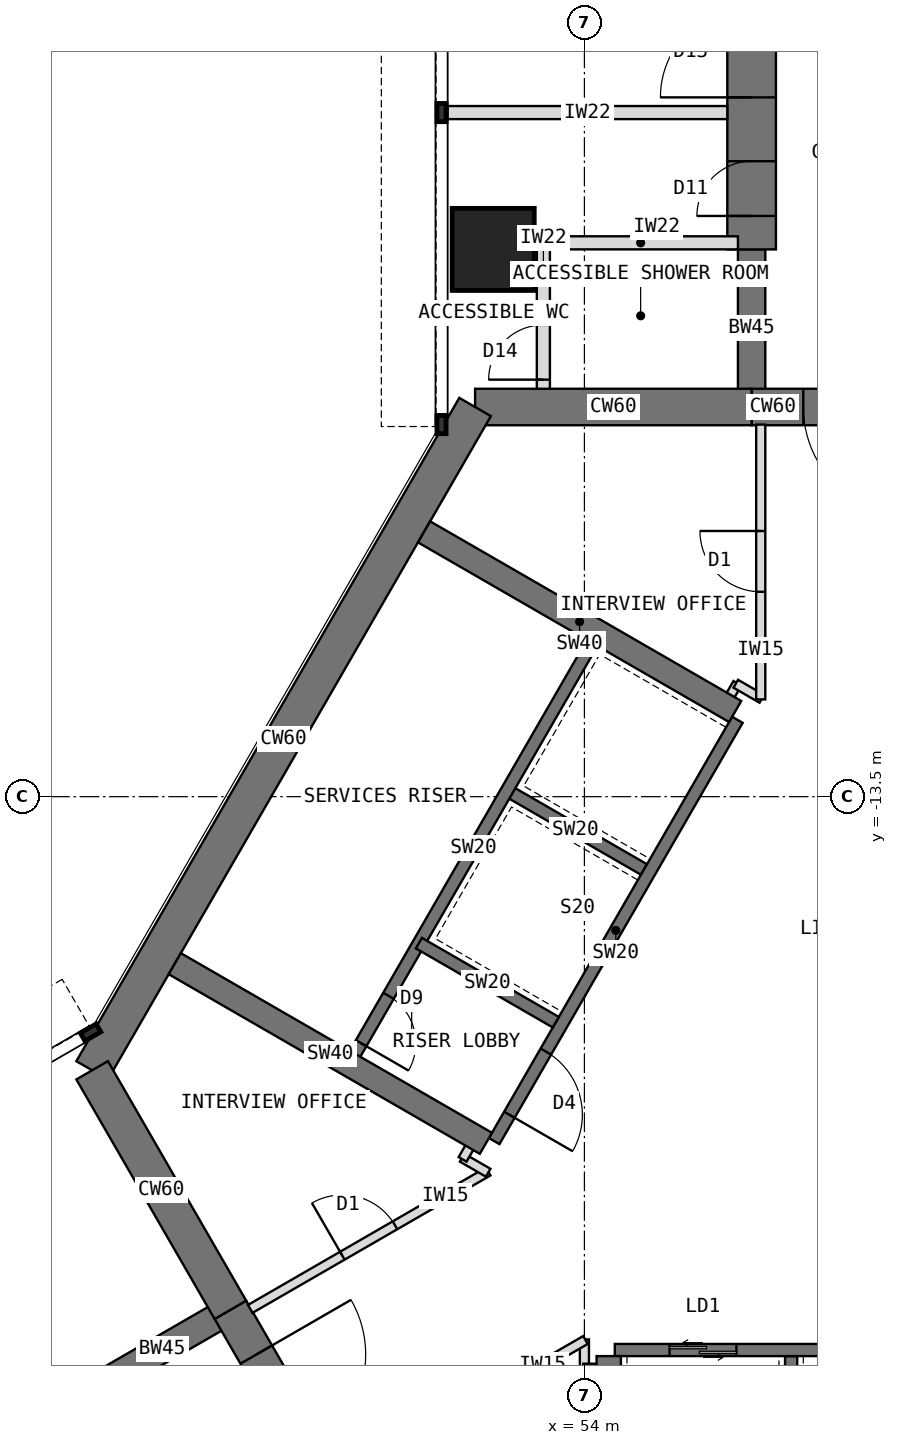
"""IFC4 building model, lengths in metres.
Left out: names, types, materials, properties, quantities, classifications, styles, units other than length and angle.
Written with IfcOpenShell. Run it as: python <this file> out.ifc"""

import sys

from ifc_helpers import new_model, si_unit, direction, frame, frame_2d, origin, origin_2d, place, context, subcontext, project, spatial, rectangle, extrude, element, fill, save


model = new_model("IFC4")
c1 = context("Model", 3, precision=1e-05, world=origin(), true_north=direction((0.0, 1.0)))
c2 = subcontext(c1, "Body", "Model", "MODEL_VIEW")
j1 = project(units=[si_unit("LENGTHUNIT", "METRE"), si_unit("PLANEANGLEUNIT", "RADIAN")], contexts=[c1])
p1 = place(None, origin())
s1 = spatial("IfcSite", under=j1, at=p1, CompositionType="ELEMENT")
p2 = place(p1, origin())
s2 = spatial("IfcBuilding", under=s1, at=p2, CompositionType="ELEMENT")
p3 = place(p2, frame((0.0, 0.0, 101.5)))
s3 = spatial("IfcBuildingStorey", under=s2, at=p3, CompositionType="ELEMENT", Elevation=101.5)
p4 = place(p3, frame((60.25, -7.092, 0.0), z_axis=(0.0, 0.0, 1.0), x_axis=(-1.0, 0.0, 0.0)))
e1 = element("IfcWall", 1, at=p4, inside=s3, PredefinedType="SHEAR", context=c2, shape_type="SweptSolid", body=[
    extrude(rectangle(XDim=3.5, YDim=0.6, at=frame_2d((1.75, 0.0))), origin(), (0.0, 0.0, 1.0), 4.0),
])
p5 = place(p4, frame((0.85, 0.0, 0.0)))
e2 = element("IfcOpeningElement", 2, at=p5, cuts=e1, PredefinedType="OPENING", context=c2, shape_type="SweptSolid", body=[
    extrude(rectangle(XDim=1.8, YDim=2.1, at=frame_2d((0.9, 1.05))), frame((0.0, 0.31, 0.0), z_axis=(0.0, -1.0, 0.0), x_axis=(1.0, 0.0, 0.0)), (0.0, 0.0, 1.0), 0.62),
])
p6 = place(p3, frame((56.75, -7.092, 0.0), z_axis=(0.0, 0.0, 1.0), x_axis=(-1.0, 0.0, 0.0)))
e3 = element("IfcWall", 3, at=p6, inside=s3, PredefinedType="SHEAR", context=c2, shape_type="SweptSolid", body=[
    extrude(rectangle(XDim=4.548, YDim=0.6, at=frame_2d((2.274, 0.0))), origin(), (0.0, 0.0, 1.0), 4.0),
])
p7 = place(p3, frame((52.202, -7.092, 0.0), z_axis=(0.0, 0.0, 1.0), x_axis=(-0.500005998175, -0.866021940709, 0.0)))
e4 = element("IfcWall", 4, at=p7, inside=s3, PredefinedType="SHEAR", context=c2, shape_type="SweptSolid", body=[
    extrude(rectangle(XDim=12.596, YDim=0.6, at=frame_2d((6.298, 0.0))), origin(), (0.0, 0.0, 1.0), 4.0),
])
p8 = place(p3, frame((45.904, -18.0, 0.0), z_axis=(0.0, 0.0, 1.0), x_axis=(0.500024481964, -0.866011268655, 0.0)))
e5 = element("IfcWall", 5, at=p8, inside=s3, PredefinedType="SHEAR", context=c2, shape_type="SweptSolid", body=[
    extrude(rectangle(XDim=4.548, YDim=0.6, at=frame_2d((2.274, 0.0))), origin(), (0.0, 0.0, 1.0), 4.0),
])
p9 = place(p3, frame((48.178, -21.939, 0.0), z_axis=(0.0, 0.0, 1.0), x_axis=(0.500010275428, -0.866019471182, 0.0)))
e6 = element("IfcWall", 6, at=p9, inside=s3, PredefinedType="SHEAR", context=c2, shape_type="SweptSolid", body=[
    extrude(rectangle(XDim=3.5, YDim=0.6, at=frame_2d((1.75, 0.0))), origin(), (0.0, 0.0, 1.0), 4.0),
])
p10 = place(p9, frame((0.85, 0.0, 0.0)))
e7 = element("IfcOpeningElement", 7, at=p10, cuts=e6, PredefinedType="OPENING", context=c2, shape_type="SweptSolid", body=[
    extrude(rectangle(XDim=1.8, YDim=2.1, at=frame_2d((0.9, 1.05))), frame((0.0, 0.31, 0.0), z_axis=(0.0, -1.0, 0.0), x_axis=(1.0, 0.0, 0.0)), (0.0, 0.0, 1.0), 0.62),
])
p11 = place(p3, frame((56.75, -7.092, 0.0), z_axis=(0.0, 0.0, 1.0), x_axis=(0.0, 1.0, 0.0)))
e8 = element("IfcWall", 8, at=p11, inside=s3, PredefinedType="SHEAR", context=c2, shape_type="SweptSolid", body=[
    extrude(rectangle(XDim=2.592, YDim=0.45, at=frame_2d((1.296, 0.0))), origin(), (0.0, 0.0, 1.0), 4.0),
])
p12 = place(p3, frame((56.75, -4.5, 0.0), z_axis=(0.0, 0.0, 1.0), x_axis=(0.0, 1.0, 0.0)))
e9 = element("IfcWall", 9, at=p12, inside=s3, PredefinedType="SHEAR", context=c2, shape_type="SweptSolid", body=[
    extrude(rectangle(XDim=13.2, YDim=0.8, at=frame_2d((6.6, 0.0))), origin(), (0.0, 0.0, 1.0), 4.0),
])
p13 = place(p12, frame((0.55, 0.0, 0.0)))
e10 = element("IfcOpeningElement", 10, at=p13, cuts=e9, PredefinedType="OPENING", context=c2, shape_type="SweptSolid", body=[
    extrude(rectangle(XDim=0.9, YDim=2.1, at=frame_2d((0.45, 1.05))), frame((0.0, 0.41, 0.0), z_axis=(0.0, -1.0, 0.0), x_axis=(1.0, 0.0, 0.0)), (0.0, 0.0, 1.0), 0.82),
])
p14 = place(p12, frame((2.5, 0.0, 0.0)))
e11 = element("IfcOpeningElement", 11, at=p14, cuts=e9, PredefinedType="OPENING", context=c2, shape_type="SweptSolid", body=[
    extrude(rectangle(XDim=1.5, YDim=2.1, at=frame_2d((0.75, 1.05))), frame((0.0, 0.41, 0.0), z_axis=(0.0, -1.0, 0.0), x_axis=(1.0, 0.0, 0.0)), (0.0, 0.0, 1.0), 0.82),
])
p15 = place(p3, frame((48.178, -21.939, 0.0), z_axis=(0.0, 0.0, 1.0), x_axis=(-0.866072649678, -0.499918158782, 0.0)))
e12 = element("IfcWall", 12, at=p15, inside=s3, PredefinedType="SHEAR", context=c2, shape_type="SweptSolid", body=[
    extrude(rectangle(XDim=2.592, YDim=0.45, at=frame_2d((1.296, 0.0))), origin(), (0.0, 0.0, 1.0), 4.0),
])
p16 = place(p3, frame((52.5, -4.5, 0.0), z_axis=(0.0, 0.0, 1.0), x_axis=(1.0, 0.0, 0.0)))
e13 = element("IfcColumn", 13, at=p16, inside=s3, PredefinedType="COLUMN", context=c2, shape_type="SweptSolid", body=[
    extrude(rectangle(XDim=1.35, YDim=1.35, at=origin_2d()), origin(), (0.0, 0.0, 1.0), 4.0),
])
p17 = place(p3, frame((56.516, -12.236, 0.0), z_axis=(0.0, 0.0, 1.0), x_axis=(-0.49999894854, -0.866026010844, 0.0)))
e14 = element("IfcWall", 14, at=p17, inside=s3, PredefinedType="SHEAR", context=c2, shape_type="SweptSolid", body=[
    extrude(rectangle(XDim=8.0, YDim=0.2, at=frame_2d((4.0, 0.0))), origin(), (0.0, 0.0, 1.0), 4.0),
])
p18 = place(p17, frame((6.3, 0.0, 0.0)))
e15 = element("IfcOpeningElement", 15, at=p18, cuts=e14, PredefinedType="OPENING", context=c2, shape_type="SweptSolid", body=[
    extrude(rectangle(XDim=1.2, YDim=2.1, at=frame_2d((0.6, 1.05))), frame((0.0, 0.11, 0.0), z_axis=(0.0, -1.0, 0.0), x_axis=(1.0, 0.0, 0.0)), (0.0, 0.0, 1.0), 0.22),
])
for number, where, z_axis, x_axis in (
    (16, (54.98, -14.697, 0.0), (0.0, 0.0, 1.0), (-0.866, 0.5, 0.0)),
    (17, (53.53, -17.209, 0.0), (0.0, 0.0, 1.0), (-0.866, 0.5, 0.0)),
):
    element("IfcWall", number, at=place(p3, frame(where, z_axis=z_axis, x_axis=x_axis)), inside=s3, PredefinedType="SHEAR", context=c2, shape_type="SweptSolid", body=[
        extrude(rectangle(XDim=2.6, YDim=0.2, at=frame_2d((1.3, 0.0))), origin(), (0.0, 0.0, 1.0), 4.0),
    ])
p19 = place(p3, frame((54.178, -10.886, 0.0), z_axis=(0.0, 0.0, 1.0), x_axis=(-0.49999894854, -0.866026010844, 0.0)))
e18 = element("IfcWall", 18, at=p19, inside=s3, PredefinedType="SHEAR", context=c2, shape_type="SweptSolid", body=[
    extrude(rectangle(XDim=8.0, YDim=0.2, at=frame_2d((4.0, 0.0))), origin(), (0.0, 0.0, 1.0), 4.0),
])
p20 = place(p19, frame((6.8, 0.0, 0.0)))
e19 = element("IfcOpeningElement", 19, at=p20, cuts=e18, PredefinedType="OPENING", context=c2, shape_type="SweptSolid", body=[
    extrude(rectangle(XDim=0.9, YDim=2.1, at=frame_2d((0.45, 1.05))), frame((0.0, 0.11, 0.0), z_axis=(0.0, -1.0, 0.0), x_axis=(1.0, 0.0, 0.0)), (0.0, 0.0, 1.0), 0.22),
])
p21 = place(p3, frame((52.38, -19.201, 0.0), z_axis=(0.0, 0.0, 1.0), x_axis=(-0.866027317282, 0.49999668571, 0.0)))
e20 = element("IfcWall", 20, at=p21, inside=s3, PredefinedType="SHEAR", context=c2, shape_type="SweptSolid", body=[
    extrude(rectangle(XDim=5.908, YDim=0.4, at=frame_2d((2.954, 0.0))), origin(), (0.0, 0.0, 1.0), 4.0),
])
p22 = place(p3, frame((56.48, -12.099, 0.0), z_axis=(0.0, 0.0, 1.0), x_axis=(-0.866009424208, 0.500027676417, 0.0)))
e21 = element("IfcWall", 21, at=p22, inside=s3, PredefinedType="SHEAR", context=c2, shape_type="SweptSolid", body=[
    extrude(rectangle(XDim=5.908, YDim=0.4, at=frame_2d((2.954, 0.0))), origin(), (0.0, 0.0, 1.0), 4.0),
])
p23 = place(p3, frame((54.5, -22.6, 0.0), z_axis=(0.0, 0.0, 1.0), x_axis=(1.0, 0.0, 0.0)))
e22 = element("IfcWall", 22, at=p23, inside=s3, PredefinedType="SHEAR", context=c2, shape_type="SweptSolid", body=[
    extrude(rectangle(XDim=8.0, YDim=0.2, at=frame_2d((4.0, 0.0))), origin(), (0.0, 0.0, 1.0), 4.0),
])
p24 = place(p23, frame((6.3, 0.0, 0.0)))
e23 = element("IfcOpeningElement", 23, at=p24, cuts=e22, PredefinedType="OPENING", context=c2, shape_type="SweptSolid", body=[
    extrude(rectangle(XDim=1.2, YDim=2.1, at=frame_2d((0.6, 1.05))), frame((0.0, 0.11, 0.0), z_axis=(0.0, -1.0, 0.0), x_axis=(1.0, 0.0, 0.0)), (0.0, 0.0, 1.0), 0.22),
])
p25 = place(p23, frame((0.9, 0.0, 0.0)))
e24 = element("IfcOpeningElement", 24, at=p25, cuts=e22, PredefinedType="OPENING", context=c2, shape_type="SweptSolid", body=[
    extrude(rectangle(XDim=1.1, YDim=2.2, at=frame_2d((0.55, 1.1))), frame((0.0, 0.11, 0.0), z_axis=(0.0, -1.0, 0.0), x_axis=(1.0, 0.0, 0.0)), (0.0, 0.0, 1.0), 0.22),
])
p26 = place(p3, frame((57.4, -22.7, 0.0), z_axis=(0.0, 0.0, 1.0), x_axis=(0.0, -1.0, 0.0)))
e25 = element("IfcWall", 25, at=p26, inside=s3, PredefinedType="SHEAR", context=c2, shape_type="SweptSolid", body=[
    extrude(rectangle(XDim=2.6, YDim=0.2, at=frame_2d((1.3, 0.0))), origin(), (0.0, 0.0, 1.0), 4.0),
])
p27 = place(p3, frame((54.4, -22.7, 0.0), z_axis=(0.0, 0.0, 1.0), x_axis=(0.0, -1.0, 0.0)))
e26 = element("IfcWall", 26, at=p27, inside=s3, PredefinedType="SHEAR", context=c2, shape_type="SweptSolid", body=[
    extrude(rectangle(XDim=5.908, YDim=0.4, at=frame_2d((2.954, 0.0))), origin(), (0.0, 0.0, 1.0), 4.0),
])
p28 = place(p3, frame((56.35, -2.25, 0.0), z_axis=(0.0, 0.0, 1.0), x_axis=(-1.0, 0.0, 0.0)))
e27 = element("IfcWall", 27, at=p28, inside=s3, PredefinedType="PARTITIONING", context=c2, shape_type="SweptSolid", body=[
    extrude(rectangle(XDim=4.6, YDim=0.215, at=frame_2d((2.3, 0.0))), origin(), (0.0, 0.0, 1.0), 3.8),
])
p29 = place(p3, frame((53.325, -6.792, 0.0), z_axis=(0.0, 0.0, 1.0), x_axis=(0.0, 1.0, 0.0)))
e28 = element("IfcWall", 28, at=p29, inside=s3, PredefinedType="PARTITIONING", context=c2, shape_type="SweptSolid", body=[
    extrude(rectangle(XDim=2.4, YDim=0.215, at=frame_2d((1.2, 0.0))), origin(), (0.0, 0.0, 1.0), 3.8),
])
p30 = place(p29, frame((0.15, 0.0, 0.0)))
e29 = element("IfcOpeningElement", 29, at=p30, cuts=e28, PredefinedType="OPENING", context=c2, shape_type="SweptSolid", body=[
    extrude(rectangle(XDim=0.9, YDim=2.1, at=frame_2d((0.45, 1.05))), frame((0.0, 0.117, 0.0), z_axis=(0.0, -1.0, 0.0), x_axis=(1.0, 0.0, 0.0)), (0.0, 0.0, 1.0), 0.235),
])
p31 = place(p3, frame((56.525, -4.392, 0.0), z_axis=(0.0, 0.0, 1.0), x_axis=(-1.0, 0.0, 0.0)))
e30 = element("IfcWall", 30, at=p31, inside=s3, PredefinedType="PARTITIONING", context=c2, shape_type="SweptSolid", body=[
    extrude(rectangle(XDim=3.2, YDim=0.215, at=frame_2d((1.6, 0.0))), origin(), (0.0, 0.0, 1.0), 3.8),
])
p32 = place(p3, frame((54.0, -22.92, 0.0), z_axis=(0.0, 0.0, 1.0), x_axis=(0.0, 1.0, 0.0)))
e31 = element("IfcWall", 31, at=p32, inside=s3, PredefinedType="PARTITIONING", context=c2, shape_type="SweptSolid", body=[
    extrude(rectangle(XDim=0.494, YDim=0.15, at=frame_2d((0.247, 0.0))), origin(), (0.0, 0.0, 1.0), 3.8),
])
p33 = place(p3, frame((54.017, -22.436, 0.0), z_axis=(0.0, 0.0, 1.0), x_axis=(-0.86602002524, -0.500009315796, 0.0)))
e32 = element("IfcWall", 32, at=p33, inside=s3, PredefinedType="PARTITIONING", context=c2, shape_type="SweptSolid", body=[
    extrude(rectangle(XDim=4.519, YDim=0.15, at=frame_2d((2.259, 0.0))), origin(), (0.0, 0.0, 1.0), 3.8),
])
p34 = place(p33, frame((1.769, 0.0, 0.0)))
e33 = element("IfcOpeningElement", 33, at=p34, cuts=e32, PredefinedType="OPENING", context=c2, shape_type="SweptSolid", body=[
    extrude(rectangle(XDim=1.0, YDim=2.1, at=frame_2d((0.5, 1.05))), frame((0.0, 0.085, 0.0), z_axis=(0.0, -1.0, 0.0), x_axis=(1.0, 0.0, 0.0)), (0.0, 0.0, 1.0), 0.17),
])
p35 = place(p3, frame((48.504, -21.924, 0.0), z_axis=(0.0, 0.0, 1.0), x_axis=(0.866006515865, 0.500032713409, 0.0)))
e34 = element("IfcWall", 34, at=p35, inside=s3, PredefinedType="PARTITIONING", context=c2, shape_type="SweptSolid", body=[
    extrude(rectangle(XDim=4.518, YDim=0.15, at=frame_2d((2.259, 0.0))), origin(), (0.0, 0.0, 1.0), 3.8),
])
p36 = place(p35, frame((1.749, 0.0, 0.0)))
e35 = element("IfcOpeningElement", 35, at=p36, cuts=e34, PredefinedType="OPENING", context=c2, shape_type="SweptSolid", body=[
    extrude(rectangle(XDim=1.0, YDim=2.1, at=frame_2d((0.5, 1.05))), frame((0.0, 0.085, 0.0), z_axis=(0.0, -1.0, 0.0), x_axis=(1.0, 0.0, 0.0)), (0.0, 0.0, 1.0), 0.17),
])
p37 = place(p3, frame((52.417, -19.684, 0.0), z_axis=(0.0, 0.0, 1.0), x_axis=(-0.865831790172, 0.50033519877, 0.0)))
e36 = element("IfcWall", 36, at=p37, inside=s3, PredefinedType="PARTITIONING", context=c2, shape_type="SweptSolid", body=[
    extrude(rectangle(XDim=0.494, YDim=0.15, at=frame_2d((0.247, 0.0))), origin(), (0.0, 0.0, 1.0), 3.8),
])
for number, where, z_axis, x_axis in (
    (37, (51.997, -19.464, 0.0), (0.0, 0.0, 1.0), (0.5, 0.866, 0.0)),
    (38, (56.302, -12.008, 0.0), (0.0, 0.0, 1.0), (0.5, 0.866, 0.0)),
):
    element("IfcWall", number, at=place(p3, frame(where, z_axis=z_axis, x_axis=x_axis)), inside=s3, PredefinedType="PARTITIONING", context=c2, shape_type="SweptSolid", body=[
        extrude(rectangle(XDim=0.43, YDim=0.15, at=frame_2d((0.215, 0.0))), origin(), (0.0, 0.0, 1.0), 3.8),
    ])
p38 = place(p3, frame((56.489, -11.643, 0.0), z_axis=(0.0, 0.0, 1.0), x_axis=(0.865831790172, -0.50033519877, 0.0)))
e39 = element("IfcWall", 39, at=p38, inside=s3, PredefinedType="PARTITIONING", context=c2, shape_type="SweptSolid", body=[
    extrude(rectangle(XDim=0.494, YDim=0.15, at=frame_2d((0.247, 0.0))), origin(), (0.0, 0.0, 1.0), 3.8),
])
p39 = place(p3, frame((56.9, -11.9, 0.0), z_axis=(0.0, 0.0, 1.0), x_axis=(0.0, 1.0, 0.0)))
e40 = element("IfcWall", 40, at=p39, inside=s3, PredefinedType="PARTITIONING", context=c2, shape_type="SweptSolid", body=[
    extrude(rectangle(XDim=4.519, YDim=0.15, at=frame_2d((2.259, 0.0))), origin(), (0.0, 0.0, 1.0), 3.8),
])
p40 = place(p39, frame((1.769, 0.0, 0.0)))
e41 = element("IfcOpeningElement", 41, at=p40, cuts=e40, PredefinedType="OPENING", context=c2, shape_type="SweptSolid", body=[
    extrude(rectangle(XDim=1.0, YDim=2.1, at=frame_2d((0.5, 1.05))), frame((0.0, 0.085, 0.0), z_axis=(0.0, -1.0, 0.0), x_axis=(1.0, 0.0, 0.0)), (0.0, 0.0, 1.0), 0.17),
])
p41 = place(p3, frame((54.41, -22.9, 0.0), z_axis=(0.0, 0.0, 1.0), x_axis=(-1.0, 0.0, 0.0)))
e42 = element("IfcWall", 42, at=p41, inside=s3, PredefinedType="PARTITIONING", context=c2, shape_type="SweptSolid", body=[
    extrude(rectangle(XDim=0.43, YDim=0.15, at=frame_2d((0.215, 0.0))), origin(), (0.0, 0.0, 1.0), 3.8),
])
p42 = place(p18, origin())
e43 = element("IfcDoor", 43, at=p42, inside=s3, OperationType="SINGLE_SWING_RIGHT", PredefinedType="DOOR", context=c2, shape_type="SweptSolid", body=[
    extrude(rectangle(XDim=1.2, YDim=2.1, at=frame_2d((0.6, 1.05))), frame((0.0, 0.025, 0.0), z_axis=(0.0, -1.0, 0.0), x_axis=(1.0, 0.0, 0.0)), (0.0, 0.0, 1.0), 0.05),
])
fill(e15, e43)
p43 = place(p20, origin())
e44 = element("IfcDoor", 44, at=p43, inside=s3, OperationType="SINGLE_SWING_RIGHT", PredefinedType="DOOR", context=c2, shape_type="SweptSolid", body=[
    extrude(rectangle(XDim=0.9, YDim=2.1, at=frame_2d((0.45, 1.05))), frame((0.0, 0.025, 0.0), z_axis=(0.0, -1.0, 0.0), x_axis=(1.0, 0.0, 0.0)), (0.0, 0.0, 1.0), 0.05),
])
fill(e19, e44)
p44 = place(p25, origin())
e45 = element("IfcDoor", 45, at=p44, inside=s3, OperationType="DOUBLE_DOOR_SLIDING", PredefinedType="DOOR", context=c2, shape_type="SweptSolid", body=[
    extrude(rectangle(XDim=1.1, YDim=2.2, at=frame_2d((0.55, 1.1))), frame((0.0, 0.025, 0.0), z_axis=(0.0, -1.0, 0.0), x_axis=(1.0, 0.0, 0.0)), (0.0, 0.0, 1.0), 0.05),
])
fill(e24, e45)
p45 = place(p5, origin())
e46 = element("IfcDoor", 46, at=p45, inside=s3, OperationType="DOUBLE_DOOR_DOUBLE_SWING", PredefinedType="DOOR", context=c2, shape_type="SweptSolid", body=[
    extrude(rectangle(XDim=1.72, YDim=2.06, at=frame_2d((0.9, 1.03))), frame((0.0, 0.025, 0.0), z_axis=(0.0, -1.0, 0.0), x_axis=(1.0, 0.0, 0.0)), (0.0, 0.0, 1.0), 0.05),
    extrude(rectangle(XDim=0.04, YDim=2.1, at=frame_2d((0.02, 1.05))), frame((0.0, 0.3, 0.0), z_axis=(0.0, -1.0, 0.0), x_axis=(1.0, 0.0, 0.0)), (0.0, 0.0, 1.0), 0.6),
    extrude(rectangle(XDim=0.04, YDim=2.1, at=frame_2d((1.78, 1.05))), frame((0.0, 0.3, 0.0), z_axis=(0.0, -1.0, 0.0), x_axis=(1.0, 0.0, 0.0)), (0.0, 0.0, 1.0), 0.6),
    extrude(rectangle(XDim=1.72, YDim=0.04, at=frame_2d((0.9, 2.08))), frame((0.0, 0.3, 0.0), z_axis=(0.0, -1.0, 0.0), x_axis=(1.0, 0.0, 0.0)), (0.0, 0.0, 1.0), 0.6),
])
fill(e2, e46)
p46 = place(p10, origin())
e47 = element("IfcDoor", 47, at=p46, inside=s3, OperationType="DOUBLE_DOOR_DOUBLE_SWING", PredefinedType="DOOR", context=c2, shape_type="SweptSolid", body=[
    extrude(rectangle(XDim=1.72, YDim=2.06, at=frame_2d((0.9, 1.03))), frame((0.0, 0.025, 0.0), z_axis=(0.0, -1.0, 0.0), x_axis=(1.0, 0.0, 0.0)), (0.0, 0.0, 1.0), 0.05),
    extrude(rectangle(XDim=0.04, YDim=2.1, at=frame_2d((0.02, 1.05))), frame((0.0, 0.3, 0.0), z_axis=(0.0, -1.0, 0.0), x_axis=(1.0, 0.0, 0.0)), (0.0, 0.0, 1.0), 0.6),
    extrude(rectangle(XDim=0.04, YDim=2.1, at=frame_2d((1.78, 1.05))), frame((0.0, 0.3, 0.0), z_axis=(0.0, -1.0, 0.0), x_axis=(1.0, 0.0, 0.0)), (0.0, 0.0, 1.0), 0.6),
    extrude(rectangle(XDim=1.72, YDim=0.04, at=frame_2d((0.9, 2.08))), frame((0.0, 0.3, 0.0), z_axis=(0.0, -1.0, 0.0), x_axis=(1.0, 0.0, 0.0)), (0.0, 0.0, 1.0), 0.6),
])
fill(e7, e47)
p47 = place(p30, origin())
e48 = element("IfcDoor", 48, at=p47, inside=s3, OperationType="SINGLE_SWING_LEFT", PredefinedType="DOOR", context=c2, shape_type="SweptSolid", body=[
    extrude(rectangle(XDim=0.9, YDim=2.1, at=frame_2d((0.45, 1.05))), frame((0.0, 0.025, 0.0), z_axis=(0.0, -1.0, 0.0), x_axis=(1.0, 0.0, 0.0)), (0.0, 0.0, 1.0), 0.05),
])
fill(e29, e48)
p48 = place(p36, origin())
e49 = element("IfcDoor", 49, at=p48, inside=s3, OperationType="SINGLE_SWING_LEFT", PredefinedType="DOOR", context=c2, shape_type="SweptSolid", body=[
    extrude(rectangle(XDim=1.0, YDim=2.1, at=frame_2d((0.5, 1.05))), frame((0.0, 0.025, 0.0), z_axis=(0.0, -1.0, 0.0), x_axis=(1.0, 0.0, 0.0)), (0.0, 0.0, 1.0), 0.05),
])
fill(e35, e49)
p49 = place(p40, origin())
e50 = element("IfcDoor", 50, at=p49, inside=s3, OperationType="SINGLE_SWING_RIGHT", PredefinedType="DOOR", context=c2, shape_type="SweptSolid", body=[
    extrude(rectangle(XDim=1.0, YDim=2.1, at=frame_2d((0.5, 1.05))), frame((0.0, 0.025, 0.0), z_axis=(0.0, -1.0, 0.0), x_axis=(1.0, 0.0, 0.0)), (0.0, 0.0, 1.0), 0.05),
])
fill(e41, e50)
p50 = place(p13, origin())
e51 = element("IfcDoor", 51, at=p50, inside=s3, OperationType="SINGLE_SWING_LEFT", PredefinedType="DOOR", context=c2, shape_type="SweptSolid", body=[
    extrude(rectangle(XDim=0.82, YDim=2.06, at=frame_2d((0.45, 1.03))), frame((0.0, 0.025, 0.0), z_axis=(0.0, -1.0, 0.0), x_axis=(1.0, 0.0, 0.0)), (0.0, 0.0, 1.0), 0.05),
    extrude(rectangle(XDim=0.04, YDim=2.1, at=frame_2d((0.02, 1.05))), frame((0.0, 0.4, 0.0), z_axis=(0.0, -1.0, 0.0), x_axis=(1.0, 0.0, 0.0)), (0.0, 0.0, 1.0), 0.8),
    extrude(rectangle(XDim=0.04, YDim=2.1, at=frame_2d((0.88, 1.05))), frame((0.0, 0.4, 0.0), z_axis=(0.0, -1.0, 0.0), x_axis=(1.0, 0.0, 0.0)), (0.0, 0.0, 1.0), 0.8),
    extrude(rectangle(XDim=0.82, YDim=0.04, at=frame_2d((0.45, 2.08))), frame((0.0, 0.4, 0.0), z_axis=(0.0, -1.0, 0.0), x_axis=(1.0, 0.0, 0.0)), (0.0, 0.0, 1.0), 0.8),
])
fill(e10, e51)
p51 = place(p14, origin())
e52 = element("IfcDoor", 52, at=p51, inside=s3, OperationType="DOUBLE_DOOR_SINGLE_SWING", PredefinedType="DOOR", context=c2, shape_type="SweptSolid", body=[
    extrude(rectangle(XDim=1.42, YDim=2.06, at=frame_2d((0.75, 1.03))), frame((0.0, 0.025, 0.0), z_axis=(0.0, -1.0, 0.0), x_axis=(1.0, 0.0, 0.0)), (0.0, 0.0, 1.0), 0.05),
    extrude(rectangle(XDim=0.04, YDim=2.1, at=frame_2d((0.02, 1.05))), frame((0.0, 0.4, 0.0), z_axis=(0.0, -1.0, 0.0), x_axis=(1.0, 0.0, 0.0)), (0.0, 0.0, 1.0), 0.8),
    extrude(rectangle(XDim=0.04, YDim=2.1, at=frame_2d((1.48, 1.05))), frame((0.0, 0.4, 0.0), z_axis=(0.0, -1.0, 0.0), x_axis=(1.0, 0.0, 0.0)), (0.0, 0.0, 1.0), 0.8),
    extrude(rectangle(XDim=1.42, YDim=0.04, at=frame_2d((0.75, 2.08))), frame((0.0, 0.4, 0.0), z_axis=(0.0, -1.0, 0.0), x_axis=(1.0, 0.0, 0.0)), (0.0, 0.0, 1.0), 0.8),
])
fill(e11, e52)
save(model, sys.argv[1])
